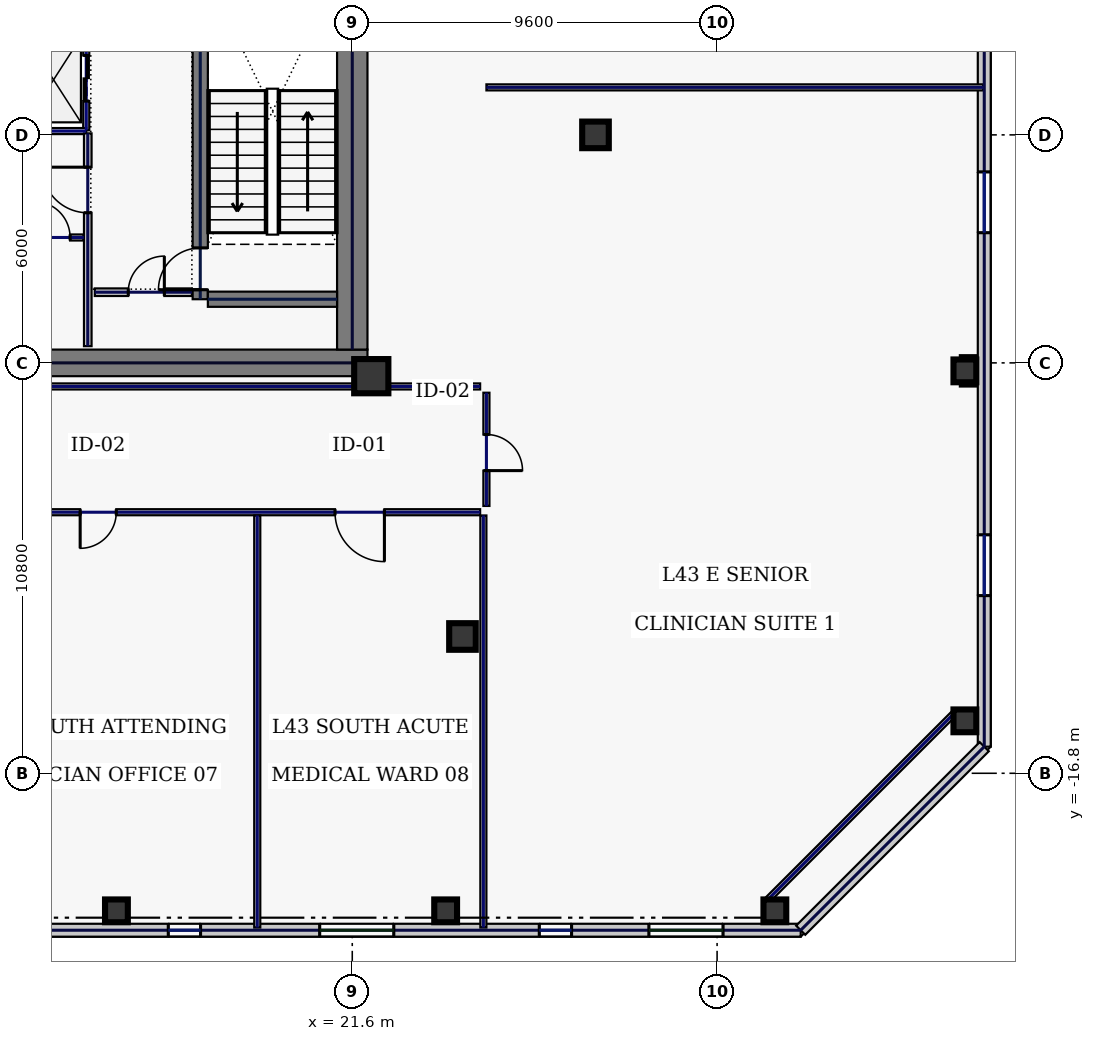
"""IFC4 building model, lengths in metres.
Left out: names, types, materials, properties, quantities, classifications, styles, units other than length and angle.
Written with IfcOpenShell. Run it as: python <this file> out.ifc"""

import sys

from ifc_helpers import new_model, si_unit, direction, frame, frame_2d, origin, origin_2d, place, context, subcontext, project, spatial, rectangle, hollow_rectangle, extrude, element, fill, save


model = new_model("IFC4")
c1 = context("Model", 3, precision=1e-05, world=origin(), true_north=direction((0.0, 1.0)))
c2 = subcontext(c1, "Body", "Model", "MODEL_VIEW")
j1 = project(units=[si_unit("LENGTHUNIT", "METRE"), si_unit("PLANEANGLEUNIT", "RADIAN")], contexts=[c1])
p1 = place(None, origin())
s1 = spatial("IfcSite", under=j1, at=p1, CompositionType="ELEMENT")
p2 = place(p1, origin())
s2 = spatial("IfcBuilding", under=s1, at=p2, CompositionType="ELEMENT")
p3 = place(p2, frame((0.0, 0.0, 188.2)))
s3 = spatial("IfcBuildingStorey", under=s2, at=p3, CompositionType="ELEMENT", Elevation=188.2)
p4 = place(p3, frame((10.45, -6.0, 0.0), z_axis=(0.0, 0.0, 1.0), x_axis=(1.0, 0.0, 0.0)))
e1 = element("IfcWall", 1, at=p4, inside=s3, PredefinedType="SHEAR", context=c2, shape_type="SweptSolid", body=[
    extrude(rectangle(XDim=11.55, YDim=0.7, at=frame_2d((5.775, 0.0))), origin(), (0.0, 0.0, 1.0), 3.74),
])
p5 = place(p3, frame((21.6, -5.65, 0.0), z_axis=(0.0, 0.0, 1.0), x_axis=(0.0, 1.0, 0.0)))
e2 = element("IfcWall", 2, at=p5, inside=s3, PredefinedType="SHEAR", context=c2, shape_type="SweptSolid", body=[
    extrude(rectangle(XDim=11.3, YDim=0.8, at=frame_2d((5.65, 0.0))), origin(), (0.0, 0.0, 1.0), 3.74),
])
p6 = place(p3, frame((17.6, -4.325, 0.0), z_axis=(0.0, 0.0, 1.0), x_axis=(0.0, 1.0, 0.0)))
e3 = element("IfcWall", 3, at=p6, inside=s3, PredefinedType="SHEAR", context=c2, shape_type="SweptSolid", body=[
    extrude(rectangle(XDim=8.65, YDim=0.4, at=frame_2d((4.325, 0.0))), origin(), (0.0, 0.0, 1.0), 3.74),
])
p7 = place(p6, frame((0.25, 0.0, 0.0)))
e4 = element("IfcOpeningElement", 4, at=p7, cuts=e3, PredefinedType="OPENING", context=c2, shape_type="SweptSolid", body=[
    extrude(rectangle(XDim=1.1, YDim=2.2, at=frame_2d((0.55, 1.1))), frame((0.0, 0.21, 0.0), z_axis=(0.0, -1.0, 0.0), x_axis=(1.0, 0.0, 0.0)), (0.0, 0.0, 1.0), 0.42),
])
p8 = place(p3, frame((17.8, -4.325, 0.0), z_axis=(0.0, 0.0, 1.0), x_axis=(1.0, 0.0, 0.0)))
e5 = element("IfcWall", 5, at=p8, inside=s3, PredefinedType="SHEAR", context=c2, shape_type="SweptSolid", body=[
    extrude(rectangle(XDim=3.4, YDim=0.4, at=frame_2d((1.7, 0.0))), origin(), (0.0, 0.0, 1.0), 3.74),
])
p9 = place(p3, frame((22.1, -6.35, 0.0), z_axis=(0.0, 0.0, 1.0), x_axis=(1.0, 0.0, 0.0)))
e6 = element("IfcColumn", 6, at=p9, inside=s3, PredefinedType="COLUMN", context=c2, shape_type="SweptSolid", body=[
    extrude(hollow_rectangle(XDim=0.9, YDim=0.9, WallThickness=0.04, at=origin_2d()), origin(), (0.0, 0.0, 1.0), 3.74),
])
for number, where, z_axis, x_axis in (
    (7, (24.5, -13.2, 0.0), (0.0, 0.0, 1.0), (1.0, 0.0, 0.0)),
    (8, (28.0, 0.0, 0.0), (0.0, 0.0, 1.0), (1.0, 0.0, 0.0)),
):
    element("IfcColumn", number, at=place(p3, frame(where, z_axis=z_axis, x_axis=x_axis)), inside=s3, PredefinedType="COLUMN", context=c2, shape_type="SweptSolid", body=[
        extrude(hollow_rectangle(XDim=0.7, YDim=0.7, WallThickness=0.032, at=origin_2d()), origin(), (0.0, 0.0, 1.0), 3.74),
    ])
for number, where, z_axis, x_axis in (
    (9, (15.394, -20.42, 0.0), (0.0, 0.0, 1.0), (1.0, 0.0, 0.0)),
    (10, (24.057, -20.42, 0.0), (0.0, 0.0, 1.0), (1.0, 0.0, 0.0)),
    (11, (32.72, -20.42, 0.0), (0.0, 0.0, 1.0), (1.0, 0.0, 0.0)),
    (12, (37.72, -15.42, 0.0), (0.0, 0.0, 1.0), (1.0, 0.0, 0.0)),
    (13, (37.72, -6.21, 0.0), (0.0, 0.0, 1.0), (1.0, 0.0, 0.0)),
):
    element("IfcColumn", number, at=place(p3, frame(where, z_axis=z_axis, x_axis=x_axis)), inside=s3, PredefinedType="COLUMN", context=c2, shape_type="SweptSolid", body=[
        extrude(hollow_rectangle(XDim=0.6, YDim=0.6, WallThickness=0.028, at=origin_2d()), origin(), (0.0, 0.0, 1.0), 3.74),
    ])
p10 = place(p3, frame((13.463, -20.93, 0.0), z_axis=(0.0, 0.0, 1.0), x_axis=(1.0, 0.0, 0.0)))
e14 = element("IfcWall", 14, at=p10, inside=s3, PredefinedType="STANDARD", context=c2, shape_type="SweptSolid", body=[
    extrude(rectangle(XDim=19.937, YDim=0.34, at=frame_2d((9.969, 0.0))), origin(), (0.0, 0.0, 1.0), 3.74),
])
p11 = place(p10, frame((3.295, 0.0, 0.8)))
e15 = element("IfcOpeningElement", 15, at=p11, cuts=e14, PredefinedType="OPENING", context=c2, shape_type="SweptSolid", body=[
    extrude(rectangle(XDim=0.85, YDim=1.85, at=frame_2d((0.425, 0.925))), frame((0.0, 0.18, 0.0), z_axis=(0.0, -1.0, 0.0), x_axis=(1.0, 0.0, 0.0)), (0.0, 0.0, 1.0), 0.36),
])
p12 = place(p10, frame((7.28, 0.0, 0.8)))
e16 = element("IfcOpeningElement", 16, at=p12, cuts=e14, PredefinedType="OPENING", context=c2, shape_type="SweptSolid", body=[
    extrude(rectangle(XDim=1.95, YDim=2.1, at=frame_2d((0.975, 1.05))), frame((0.0, 0.18, 0.0), z_axis=(0.0, -1.0, 0.0), x_axis=(1.0, 0.0, 0.0)), (0.0, 0.0, 1.0), 0.36),
])
p13 = place(p10, frame((13.058, 0.0, 0.8)))
e17 = element("IfcOpeningElement", 17, at=p13, cuts=e14, PredefinedType="OPENING", context=c2, shape_type="SweptSolid", body=[
    extrude(rectangle(XDim=0.85, YDim=1.85, at=frame_2d((0.425, 0.925))), frame((0.0, 0.18, 0.0), z_axis=(0.0, -1.0, 0.0), x_axis=(1.0, 0.0, 0.0)), (0.0, 0.0, 1.0), 0.36),
])
p14 = place(p10, frame((15.943, 0.0, 0.8)))
e18 = element("IfcOpeningElement", 18, at=p14, cuts=e14, PredefinedType="OPENING", context=c2, shape_type="SweptSolid", body=[
    extrude(rectangle(XDim=1.95, YDim=2.1, at=frame_2d((0.975, 1.05))), frame((0.0, 0.18, 0.0), z_axis=(0.0, -1.0, 0.0), x_axis=(1.0, 0.0, 0.0)), (0.0, 0.0, 1.0), 0.36),
])
p15 = place(p3, frame((38.23, -16.1, 0.0), z_axis=(0.0, 0.0, 1.0), x_axis=(0.0, 1.0, 0.0)))
e19 = element("IfcWall", 19, at=p15, inside=s3, PredefinedType="STANDARD", context=c2, shape_type="SweptSolid", body=[
    extrude(rectangle(XDim=38.2, YDim=0.34, at=frame_2d((19.1, 0.0))), origin(), (0.0, 0.0, 1.0), 3.74),
])
p16 = place(p15, frame((3.975, 0.0, 0.58)))
e20 = element("IfcOpeningElement", 20, at=p16, cuts=e19, PredefinedType="OPENING", context=c2, shape_type="SweptSolid", body=[
    extrude(rectangle(XDim=1.6, YDim=2.3, at=frame_2d((0.8, 1.15))), frame((0.0, 0.18, 0.0), z_axis=(0.0, -1.0, 0.0), x_axis=(1.0, 0.0, 0.0)), (0.0, 0.0, 1.0), 0.36),
])
p17 = place(p15, frame((13.525, 0.0, 0.58)))
e21 = element("IfcOpeningElement", 21, at=p17, cuts=e19, PredefinedType="OPENING", context=c2, shape_type="SweptSolid", body=[
    extrude(rectangle(XDim=1.6, YDim=2.3, at=frame_2d((0.8, 1.15))), frame((0.0, 0.18, 0.0), z_axis=(0.0, -1.0, 0.0), x_axis=(1.0, 0.0, 0.0)), (0.0, 0.0, 1.0), 0.36),
])
p18 = place(p15, frame((23.075, 0.0, 0.58)))
e22 = element("IfcOpeningElement", 22, at=p18, cuts=e19, PredefinedType="OPENING", context=c2, shape_type="SweptSolid", body=[
    extrude(rectangle(XDim=1.6, YDim=2.3, at=frame_2d((0.8, 1.15))), frame((0.0, 0.18, 0.0), z_axis=(0.0, -1.0, 0.0), x_axis=(1.0, 0.0, 0.0)), (0.0, 0.0, 1.0), 0.36),
])
p19 = place(p15, frame((32.625, 0.0, 0.58)))
e23 = element("IfcOpeningElement", 23, at=p19, cuts=e19, PredefinedType="OPENING", context=c2, shape_type="SweptSolid", body=[
    extrude(rectangle(XDim=1.6, YDim=2.3, at=frame_2d((0.8, 1.15))), frame((0.0, 0.18, 0.0), z_axis=(0.0, -1.0, 0.0), x_axis=(1.0, 0.0, 0.0)), (0.0, 0.0, 1.0), 0.36),
])
p20 = place(p3, frame((33.4, -20.93, 0.0), z_axis=(0.0, 0.0, 1.0), x_axis=(0.707124652085, 0.707088909836, 0.0)))
e24 = element("IfcWall", 24, at=p20, inside=s3, PredefinedType="STANDARD", context=c2, shape_type="SweptSolid", body=[
    extrude(rectangle(XDim=6.831, YDim=0.34, at=frame_2d((3.415, 0.0))), origin(), (0.0, 0.0, 1.0), 3.74),
])
p21 = place(p3, frame((14.6, 0.12, 0.0), z_axis=(0.0, 0.0, 1.0), x_axis=(0.0, 1.0, 0.0)))
e25 = element("IfcWall", 25, at=p21, inside=s3, PredefinedType="PARTITIONING", context=c2, shape_type="SweptSolid", body=[
    extrude(rectangle(XDim=2.74, YDim=0.16, at=frame_2d((1.37, 0.0))), origin(), (0.0, 0.0, 1.0), 3.74),
])
p22 = place(p21, frame((0.77, 0.0, 0.0)))
e26 = element("IfcOpeningElement", 26, at=p22, cuts=e25, PredefinedType="OPENING", context=c2, shape_type="SweptSolid", body=[
    extrude(rectangle(XDim=1.2, YDim=2.2, at=frame_2d((0.6, 1.1))), frame((0.0, 0.09, 0.0), z_axis=(0.0, -1.0, 0.0), x_axis=(1.0, 0.0, 0.0)), (0.0, 0.0, 1.0), 0.18),
])
p23 = place(p3, frame((12.84, 0.1, 0.0), z_axis=(0.0, 0.0, 1.0), x_axis=(1.0, 0.0, 0.0)))
e27 = element("IfcWall", 27, at=p23, inside=s3, PredefinedType="PARTITIONING", context=c2, shape_type="SweptSolid", body=[
    extrude(rectangle(XDim=1.76, YDim=0.16, at=frame_2d((0.88, 0.0))), origin(), (0.0, 0.0, 1.0), 3.74),
])
p24 = place(p3, frame((14.825, -4.14, 0.0), z_axis=(0.0, 0.0, 1.0), x_axis=(1.0, 0.0, 0.0)))
e28 = element("IfcWall", 28, at=p24, inside=s3, PredefinedType="SOLIDWALL", context=c2, shape_type="SweptSolid", body=[
    extrude(rectangle(XDim=2.555, YDim=0.2, at=frame_2d((1.277, 0.0))), origin(), (0.0, 0.0, 1.0), 3.74),
])
p25 = place(p24, frame((0.88, 0.0, 0.0)))
e29 = element("IfcOpeningElement", 29, at=p25, cuts=e28, PredefinedType="OPENING", context=c2, shape_type="SweptSolid", body=[
    extrude(rectangle(XDim=0.95, YDim=2.2, at=frame_2d((0.475, 1.1))), frame((0.0, 0.11, 0.0), z_axis=(0.0, -1.0, 0.0), x_axis=(1.0, 0.0, 0.0)), (0.0, 0.0, 1.0), 0.22),
])
p26 = place(p3, frame((12.775, -2.7, 0.0), z_axis=(0.0, 0.0, 1.0), x_axis=(1.0, 0.0, 0.0)))
e30 = element("IfcWall", 30, at=p26, inside=s3, PredefinedType="PARTITIONING", context=c2, shape_type="SweptSolid", body=[
    extrude(rectangle(XDim=1.76, YDim=0.16, at=frame_2d((0.88, 0.0))), origin(), (0.0, 0.0, 1.0), 3.74),
])
p27 = place(p26, frame((0.45, 0.0, 0.0)))
e31 = element("IfcOpeningElement", 31, at=p27, cuts=e30, PredefinedType="OPENING", context=c2, shape_type="SweptSolid", body=[
    extrude(rectangle(XDim=0.95, YDim=2.2, at=frame_2d((0.475, 1.1))), frame((0.0, 0.09, 0.0), z_axis=(0.0, -1.0, 0.0), x_axis=(1.0, 0.0, 0.0)), (0.0, 0.0, 1.0), 0.18),
])
p28 = place(p3, frame((14.64, -5.56, 0.0), z_axis=(0.0, 0.0, 1.0), x_axis=(0.0, 1.0, 0.0)))
e32 = element("IfcWall", 32, at=p28, inside=s3, PredefinedType="SOLIDWALL", context=c2, shape_type="SweptSolid", body=[
    extrude(rectangle(XDim=5.6, YDim=0.2, at=frame_2d((2.8, 0.0))), origin(), (0.0, 0.0, 1.0), 3.74),
])
p29 = place(p28, frame((3.51, 0.0, 0.0)))
e33 = element("IfcOpeningElement", 33, at=p29, cuts=e32, PredefinedType="OPENING", context=c2, shape_type="SweptSolid", body=[
    extrude(rectangle(XDim=1.2, YDim=2.2, at=frame_2d((0.6, 1.1))), frame((0.0, 0.11, 0.0), z_axis=(0.0, -1.0, 0.0), x_axis=(1.0, 0.0, 0.0)), (0.0, 0.0, 1.0), 0.22),
])
p30 = place(p3, frame((32.479, -20.18, 0.0), z_axis=(0.0, 0.0, 1.0), x_axis=(0.707106781187, 0.707106781187, 0.0)))
e34 = element("IfcWall", 34, at=p30, inside=s3, PredefinedType="PARTITIONING", context=c2, shape_type="SweptSolid", body=[
    extrude(rectangle(XDim=7.071, YDim=0.16, at=frame_2d((3.536, 0.0))), origin(), (0.0, 0.0, 1.0), 3.74),
])
p31 = place(p3, frame((10.63, -6.62, 0.0), z_axis=(0.0, 0.0, 1.0), x_axis=(1.0, 0.0, 0.0)))
e35 = element("IfcWall", 35, at=p31, inside=s3, PredefinedType="PARTITIONING", context=c2, shape_type="SweptSolid", body=[
    extrude(rectangle(XDim=14.335, YDim=0.16, at=frame_2d((7.167, 0.0))), origin(), (0.0, 0.0, 1.0), 3.74),
])
p32 = place(p3, frame((25.13, -6.785, 0.0), z_axis=(0.0, 0.0, 1.0), x_axis=(0.0, -1.0, 0.0)))
e36 = element("IfcWall", 36, at=p32, inside=s3, PredefinedType="PARTITIONING", context=c2, shape_type="SweptSolid", body=[
    extrude(rectangle(XDim=2.98, YDim=0.16, at=frame_2d((1.49, 0.0))), origin(), (0.0, 0.0, 1.0), 3.74),
])
p33 = place(p32, frame((1.1, 0.0, 0.0)))
e37 = element("IfcOpeningElement", 37, at=p33, cuts=e36, PredefinedType="OPENING", context=c2, shape_type="SweptSolid", body=[
    extrude(rectangle(XDim=0.95, YDim=2.2, at=frame_2d((0.475, 1.1))), frame((0.0, 0.09, 0.0), z_axis=(0.0, -1.0, 0.0), x_axis=(1.0, 0.0, 0.0)), (0.0, 0.0, 1.0), 0.18),
])
p34 = place(p3, frame((24.965, -9.93, 0.0), z_axis=(0.0, 0.0, 1.0), x_axis=(-1.0, 0.0, 0.0)))
e38 = element("IfcWall", 38, at=p34, inside=s3, PredefinedType="PARTITIONING", context=c2, shape_type="SweptSolid", body=[
    extrude(rectangle(XDim=49.93, YDim=0.16, at=frame_2d((24.965, 0.0))), origin(), (0.0, 0.0, 1.0), 3.74),
])
p35 = place(p34, frame((47.106, 0.0, 0.0)))
e39 = element("IfcOpeningElement", 39, at=p35, cuts=e38, PredefinedType="OPENING", context=c2, shape_type="SweptSolid", body=[
    extrude(rectangle(XDim=0.95, YDim=2.2, at=frame_2d((0.475, 1.1))), frame((0.0, 0.09, 0.0), z_axis=(0.0, -1.0, 0.0), x_axis=(1.0, 0.0, 0.0)), (0.0, 0.0, 1.0), 0.18),
])
p36 = place(p34, frame((41.925, 0.0, 0.0)))
e40 = element("IfcOpeningElement", 40, at=p36, cuts=e38, PredefinedType="OPENING", context=c2, shape_type="SweptSolid", body=[
    extrude(rectangle(XDim=0.95, YDim=2.2, at=frame_2d((0.475, 1.1))), frame((0.0, 0.09, 0.0), z_axis=(0.0, -1.0, 0.0), x_axis=(1.0, 0.0, 0.0)), (0.0, 0.0, 1.0), 0.18),
])
p37 = place(p34, frame((34.8, 0.0, 0.0)))
e41 = element("IfcOpeningElement", 41, at=p37, cuts=e38, PredefinedType="OPENING", context=c2, shape_type="SweptSolid", body=[
    extrude(rectangle(XDim=1.3, YDim=2.2, at=frame_2d((0.65, 1.1))), frame((0.0, 0.09, 0.0), z_axis=(0.0, -1.0, 0.0), x_axis=(1.0, 0.0, 0.0)), (0.0, 0.0, 1.0), 0.18),
])
p38 = place(p34, frame((28.25, 0.0, 0.0)))
e42 = element("IfcOpeningElement", 42, at=p38, cuts=e38, PredefinedType="OPENING", context=c2, shape_type="SweptSolid", body=[
    extrude(rectangle(XDim=1.05, YDim=2.2, at=frame_2d((0.525, 1.1))), frame((0.0, 0.09, 0.0), z_axis=(0.0, -1.0, 0.0), x_axis=(1.0, 0.0, 0.0)), (0.0, 0.0, 1.0), 0.18),
])
p39 = place(p34, frame((21.925, 0.0, 0.0)))
e43 = element("IfcOpeningElement", 43, at=p39, cuts=e38, PredefinedType="OPENING", context=c2, shape_type="SweptSolid", body=[
    extrude(rectangle(XDim=0.95, YDim=2.2, at=frame_2d((0.475, 1.1))), frame((0.0, 0.09, 0.0), z_axis=(0.0, -1.0, 0.0), x_axis=(1.0, 0.0, 0.0)), (0.0, 0.0, 1.0), 0.18),
])
p40 = place(p34, frame((16.05, 0.0, 0.0)))
e44 = element("IfcOpeningElement", 44, at=p40, cuts=e38, PredefinedType="OPENING", context=c2, shape_type="SweptSolid", body=[
    extrude(rectangle(XDim=0.95, YDim=2.2, at=frame_2d((0.475, 1.1))), frame((0.0, 0.09, 0.0), z_axis=(0.0, -1.0, 0.0), x_axis=(1.0, 0.0, 0.0)), (0.0, 0.0, 1.0), 0.18),
])
p41 = place(p34, frame((9.575, 0.0, 0.0)))
e45 = element("IfcOpeningElement", 45, at=p41, cuts=e38, PredefinedType="OPENING", context=c2, shape_type="SweptSolid", body=[
    extrude(rectangle(XDim=0.95, YDim=2.2, at=frame_2d((0.475, 1.1))), frame((0.0, 0.09, 0.0), z_axis=(0.0, -1.0, 0.0), x_axis=(1.0, 0.0, 0.0)), (0.0, 0.0, 1.0), 0.18),
])
p42 = place(p34, frame((2.519, 0.0, 0.0)))
e46 = element("IfcOpeningElement", 46, at=p42, cuts=e38, PredefinedType="OPENING", context=c2, shape_type="SweptSolid", body=[
    extrude(rectangle(XDim=1.3, YDim=2.2, at=frame_2d((0.65, 1.1))), frame((0.0, 0.09, 0.0), z_axis=(0.0, -1.0, 0.0), x_axis=(1.0, 0.0, 0.0)), (0.0, 0.0, 1.0), 0.18),
])
for number, where, z_axis, x_axis in (
    (47, (25.05, -20.86, 0.0), (0.0, 0.0, 1.0), (0.0, 1.0, 0.0)),
    (48, (19.1, -20.86, 0.0), (0.0, 0.0, 1.0), (0.0, 1.0, 0.0)),
):
    element("IfcWall", number, at=place(p3, frame(where, z_axis=z_axis, x_axis=x_axis)), inside=s3, PredefinedType="PARTITIONING", context=c2, shape_type="SweptSolid", body=[
        extrude(rectangle(XDim=10.845, YDim=0.16, at=frame_2d((5.423, 0.0))), origin(), (0.0, 0.0, 1.0), 3.74),
    ])
p43 = place(p3, frame((25.13, 1.25, 0.0), z_axis=(0.0, 0.0, 1.0), x_axis=(1.0, 0.0, 0.0)))
e49 = element("IfcWall", 49, at=p43, inside=s3, PredefinedType="PARTITIONING", context=c2, shape_type="SweptSolid", body=[
    extrude(rectangle(XDim=13.08, YDim=0.16, at=frame_2d((6.54, 0.0))), origin(), (0.0, 0.0, 1.0), 3.285),
])
p44 = place(p11, origin())
e50 = element("IfcWindow", 50, at=p44, inside=s3, PartitioningType="SINGLE_PANEL", PredefinedType="WINDOW", context=c2, shape_type="SweptSolid", body=[
    extrude(rectangle(XDim=0.85, YDim=1.85, at=frame_2d((0.425, 0.925))), frame((0.0, 0.03, 0.0), z_axis=(0.0, -1.0, 0.0), x_axis=(1.0, 0.0, 0.0)), (0.0, 0.0, 1.0), 0.06),
])
fill(e15, e50)
p45 = place(p12, origin())
e51 = element("IfcWindow", 51, at=p45, inside=s3, PartitioningType="SINGLE_PANEL", PredefinedType="WINDOW", context=c2, shape_type="SweptSolid", body=[
    extrude(rectangle(XDim=1.95, YDim=2.1, at=frame_2d((0.975, 1.05))), frame((0.0, 0.03, 0.0), z_axis=(0.0, -1.0, 0.0), x_axis=(1.0, 0.0, 0.0)), (0.0, 0.0, 1.0), 0.06),
])
fill(e16, e51)
p46 = place(p13, origin())
e52 = element("IfcWindow", 52, at=p46, inside=s3, PartitioningType="SINGLE_PANEL", PredefinedType="WINDOW", context=c2, shape_type="SweptSolid", body=[
    extrude(rectangle(XDim=0.85, YDim=1.85, at=frame_2d((0.425, 0.925))), frame((0.0, 0.03, 0.0), z_axis=(0.0, -1.0, 0.0), x_axis=(1.0, 0.0, 0.0)), (0.0, 0.0, 1.0), 0.06),
])
fill(e17, e52)
p47 = place(p14, origin())
e53 = element("IfcWindow", 53, at=p47, inside=s3, PartitioningType="SINGLE_PANEL", PredefinedType="WINDOW", context=c2, shape_type="SweptSolid", body=[
    extrude(rectangle(XDim=1.95, YDim=2.1, at=frame_2d((0.975, 1.05))), frame((0.0, 0.03, 0.0), z_axis=(0.0, -1.0, 0.0), x_axis=(1.0, 0.0, 0.0)), (0.0, 0.0, 1.0), 0.06),
])
fill(e18, e53)
p48 = place(p16, origin())
e54 = element("IfcWindow", 54, at=p48, inside=s3, PartitioningType="SINGLE_PANEL", PredefinedType="WINDOW", context=c2, shape_type="SweptSolid", body=[
    extrude(rectangle(XDim=1.6, YDim=2.3, at=frame_2d((0.8, 1.15))), frame((0.0, 0.03, 0.0), z_axis=(0.0, -1.0, 0.0), x_axis=(1.0, 0.0, 0.0)), (0.0, 0.0, 1.0), 0.06),
])
fill(e20, e54)
p49 = place(p17, origin())
e55 = element("IfcWindow", 55, at=p49, inside=s3, PartitioningType="SINGLE_PANEL", PredefinedType="WINDOW", context=c2, shape_type="SweptSolid", body=[
    extrude(rectangle(XDim=1.6, YDim=2.3, at=frame_2d((0.8, 1.15))), frame((0.0, 0.03, 0.0), z_axis=(0.0, -1.0, 0.0), x_axis=(1.0, 0.0, 0.0)), (0.0, 0.0, 1.0), 0.06),
])
fill(e21, e55)
p50 = place(p7, origin())
e56 = element("IfcDoor", 56, at=p50, inside=s3, OperationType="SINGLE_SWING_LEFT", PredefinedType="DOOR", context=c2, shape_type="SweptSolid", body=[
    extrude(rectangle(XDim=1.1, YDim=2.2, at=frame_2d((0.55, 1.1))), frame((0.0, 0.025, 0.0), z_axis=(0.0, -1.0, 0.0), x_axis=(1.0, 0.0, 0.0)), (0.0, 0.0, 1.0), 0.05),
])
fill(e4, e56)
p51 = place(p22, origin())
e57 = element("IfcDoor", 57, at=p51, inside=s3, OperationType="SLIDING_TO_LEFT", PredefinedType="DOOR", context=c2, shape_type="SweptSolid", body=[
    extrude(rectangle(XDim=1.2, YDim=2.2, at=frame_2d((0.6, 1.1))), frame((0.0, 0.025, 0.0), z_axis=(0.0, -1.0, 0.0), x_axis=(1.0, 0.0, 0.0)), (0.0, 0.0, 1.0), 0.05),
])
fill(e26, e57)
p52 = place(p25, origin())
e58 = element("IfcDoor", 58, at=p52, inside=s3, OperationType="SINGLE_SWING_RIGHT", PredefinedType="DOOR", context=c2, shape_type="SweptSolid", body=[
    extrude(rectangle(XDim=0.95, YDim=2.2, at=frame_2d((0.475, 1.1))), frame((0.0, 0.025, 0.0), z_axis=(0.0, -1.0, 0.0), x_axis=(1.0, 0.0, 0.0)), (0.0, 0.0, 1.0), 0.05),
])
fill(e29, e58)
p53 = place(p27, origin())
e59 = element("IfcDoor", 59, at=p53, inside=s3, OperationType="SINGLE_SWING_LEFT", PredefinedType="DOOR", context=c2, shape_type="SweptSolid", body=[
    extrude(rectangle(XDim=0.95, YDim=2.2, at=frame_2d((0.475, 1.1))), frame((0.0, 0.025, 0.0), z_axis=(0.0, -1.0, 0.0), x_axis=(1.0, 0.0, 0.0)), (0.0, 0.0, 1.0), 0.05),
])
fill(e31, e59)
p54 = place(p29, origin())
e60 = element("IfcDoor", 60, at=p54, inside=s3, OperationType="SINGLE_SWING_RIGHT", PredefinedType="DOOR", context=c2, shape_type="SweptSolid", body=[
    extrude(rectangle(XDim=1.2, YDim=2.2, at=frame_2d((0.6, 1.1))), frame((0.0, 0.025, 0.0), z_axis=(0.0, -1.0, 0.0), x_axis=(1.0, 0.0, 0.0)), (0.0, 0.0, 1.0), 0.05),
])
fill(e33, e60)
p55 = place(p41, origin())
e61 = element("IfcDoor", 61, at=p55, inside=s3, OperationType="SINGLE_SWING_RIGHT", PredefinedType="DOOR", context=c2, shape_type="SweptSolid", body=[
    extrude(rectangle(XDim=0.95, YDim=2.2, at=frame_2d((0.475, 1.1))), frame((0.0, 0.025, 0.0), z_axis=(0.0, -1.0, 0.0), x_axis=(1.0, 0.0, 0.0)), (0.0, 0.0, 1.0), 0.05),
])
fill(e45, e61)
p56 = place(p42, origin())
e62 = element("IfcDoor", 62, at=p56, inside=s3, OperationType="SINGLE_SWING_LEFT", PredefinedType="DOOR", context=c2, shape_type="SweptSolid", body=[
    extrude(rectangle(XDim=1.3, YDim=2.2, at=frame_2d((0.65, 1.1))), frame((0.0, 0.025, 0.0), z_axis=(0.0, -1.0, 0.0), x_axis=(1.0, 0.0, 0.0)), (0.0, 0.0, 1.0), 0.05),
])
fill(e46, e62)
p57 = place(p33, origin())
e63 = element("IfcDoor", 63, at=p57, inside=s3, OperationType="SINGLE_SWING_RIGHT", PredefinedType="DOOR", context=c2, shape_type="SweptSolid", body=[
    extrude(rectangle(XDim=0.95, YDim=2.2, at=frame_2d((0.475, 1.1))), frame((0.0, 0.025, 0.0), z_axis=(0.0, -1.0, 0.0), x_axis=(1.0, 0.0, 0.0)), (0.0, 0.0, 1.0), 0.05),
])
fill(e37, e63)
save(model, sys.argv[1])
